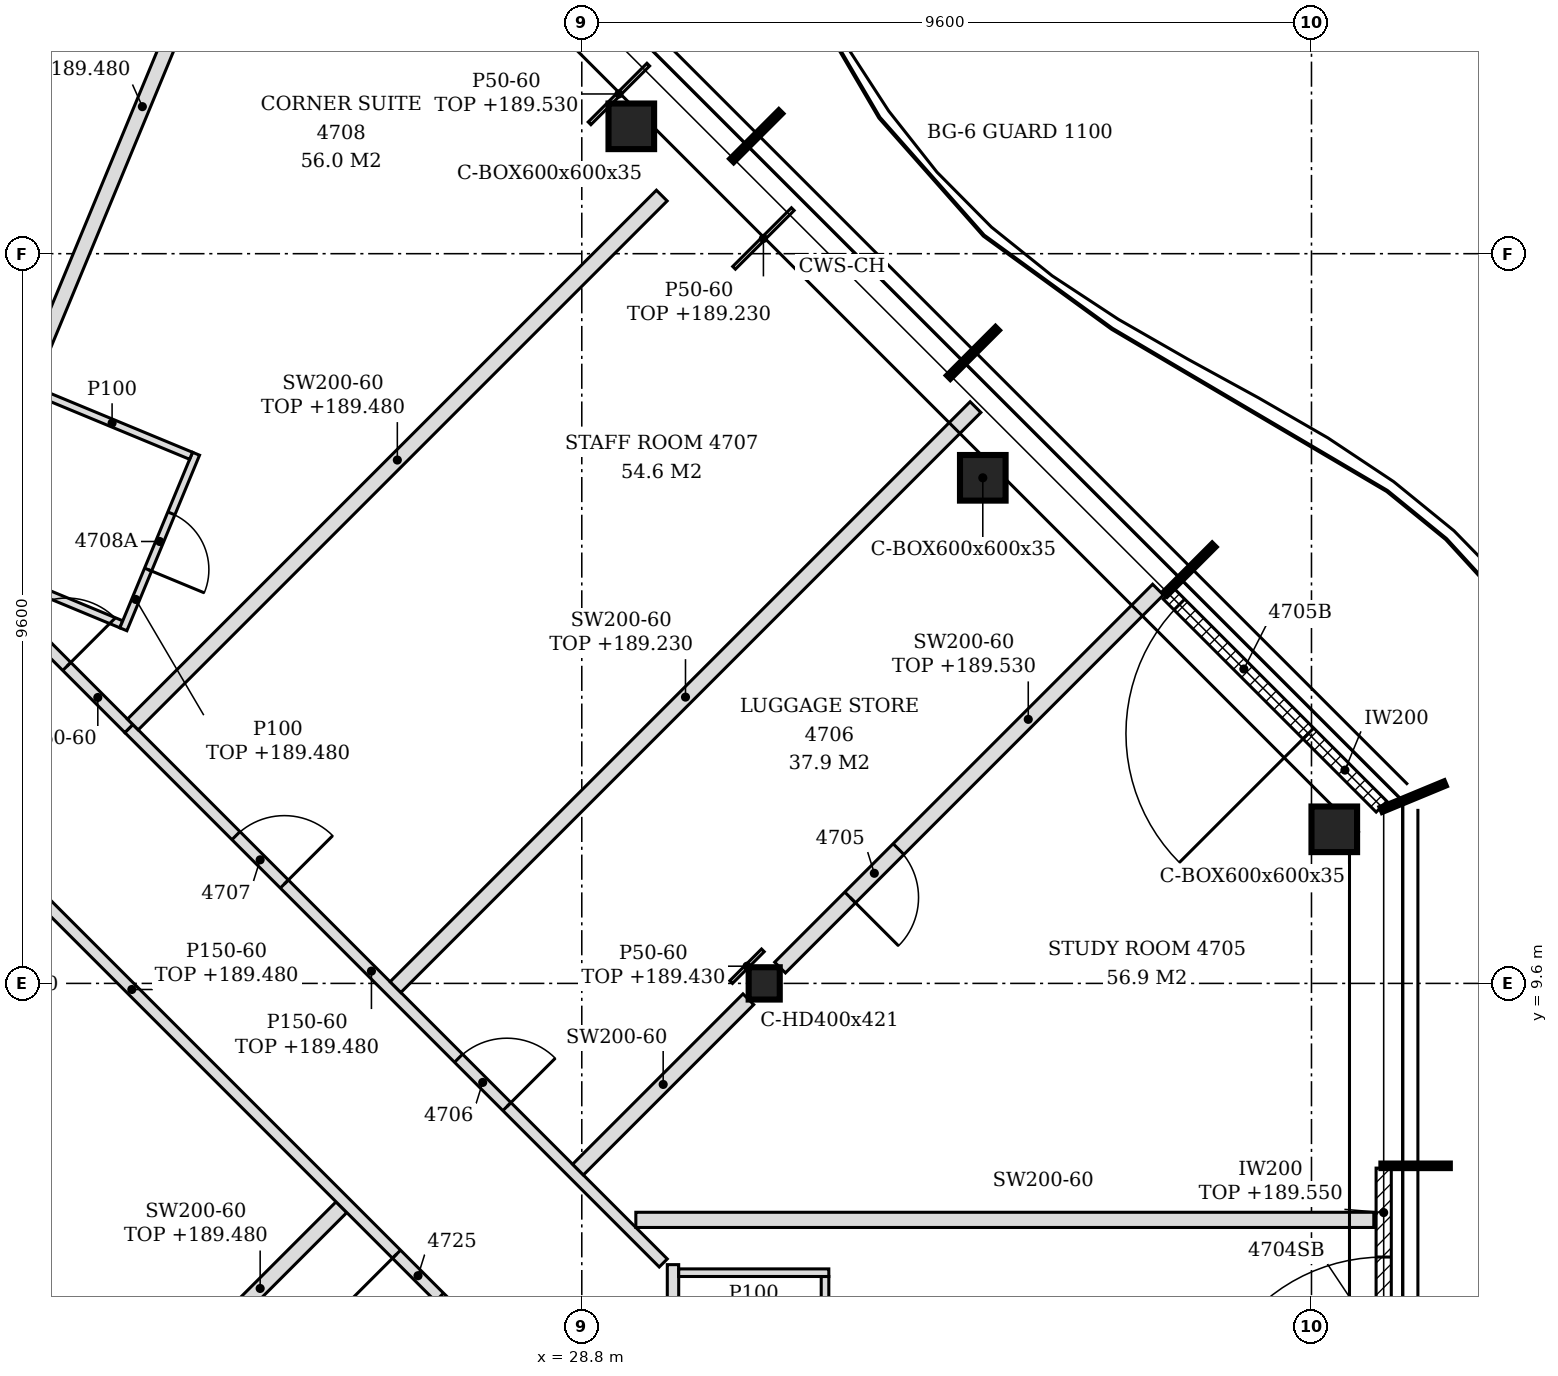
"""IFC4 building model, lengths in metres.
Left out: names, types, materials, properties, quantities, classifications, styles, units other than length and angle.
Written with IfcOpenShell. Run it as: python <this file> out.ifc"""

import sys

from ifc_helpers import new_model, si_unit, direction, frame, frame_2d, origin, origin_2d, place, context, subcontext, project, spatial, polyline, rectangle, hollow_rectangle, i_section, outline, extrude, clip, halfspace, element, fill, save


model = new_model("IFC4")
c1 = context("Model", 3, precision=1e-05, world=origin(), true_north=direction((0.0, 1.0)))
c2 = subcontext(c1, "Body", "Model", "MODEL_VIEW")
j1 = project(units=[si_unit("LENGTHUNIT", "METRE"), si_unit("PLANEANGLEUNIT", "RADIAN")], contexts=[c1])
p1 = place(None, origin())
s1 = spatial("IfcSite", under=j1, at=p1, CompositionType="ELEMENT")
p2 = place(p1, origin())
s2 = spatial("IfcBuilding", under=s1, at=p2, CompositionType="ELEMENT")
p3 = place(p2, frame((0.0, 0.0, 186.6)))
s3 = spatial("IfcBuildingStorey", under=s2, at=p3, CompositionType="ELEMENT", Elevation=186.6)
for number, where, z_axis, x_axis in (
    (1, (38.7, 11.627, -0.15), (0.387, -0.258, 0.885), (0.555, 0.832, 0.0)),
    (2, (34.076, 16.251, -0.15), (0.387, -0.258, 0.885), (0.555, 0.832, 0.0)),
):
    element("IfcColumn", number, at=place(p3, frame(where, z_axis=z_axis, x_axis=x_axis)), inside=s3, PredefinedType="COLUMN", context=c2, shape_type="Clipping", body=[
        clip(extrude(hollow_rectangle(XDim=0.6, YDim=0.6, WallThickness=0.035, at=origin_2d()), origin(), (0.0, 0.0, 1.0), 4.067), halfspace(frame((0.0, 0.0, 4.049), z_axis=(0.0, 0.0, 1.0), x_axis=(1.0, 0.0, 0.0)), False)),
    ])
p4 = place(p3, frame((29.451, 20.876, -0.15), z_axis=(0.38726387287, -0.258155907814, 0.885088820419), x_axis=(0.554670435147, 0.832070134288, 0.0)))
e3 = element("IfcColumn", 3, at=p4, inside=s3, PredefinedType="COLUMN", context=c2, shape_type="Clipping", body=[
    clip(extrude(hollow_rectangle(XDim=0.6, YDim=0.6, WallThickness=0.035, at=origin_2d()), origin(), (0.0, 0.0, 1.0), 4.067), halfspace(frame((0.0, 0.0, 4.049), z_axis=(0.0, 0.0, 1.0), x_axis=(1.0, 0.0, 0.0)), False)),
])
p5 = place(p3, frame((31.2, 9.6, -0.15), z_axis=(0.0, 0.0, 1.0), x_axis=(1.0, 0.0, 0.0)))
e4 = element("IfcColumn", 4, at=p5, inside=s3, PredefinedType="COLUMN", context=c2, shape_type="SweptSolid", body=[
    extrude(i_section(OverallWidth=0.409, OverallDepth=0.425, WebThickness=0.033, FlangeThickness=0.052, FilletRadius=0.015, at=origin_2d()), origin(), (0.0, 0.0, 1.0), 3.6),
])
p6 = place(p3, frame((39.35, 2.43, 0.0), z_axis=(0.0, 0.0, 1.0), x_axis=(0.0, 1.0, 0.0)))
e5 = element("IfcWall", 5, at=p6, inside=s3, PredefinedType="NOTDEFINED", context=c2, shape_type="SweptSolid", body=[
    extrude(rectangle(XDim=4.74, YDim=0.2, at=frame_2d((2.37, 0.0))), origin(), (0.0, 0.0, 1.0), 2.95),
])
p7 = place(p6, frame((1.17, 0.0, 0.0)))
e6 = element("IfcOpeningElement", 6, at=p7, cuts=e5, PredefinedType="OPENING", context=c2, shape_type="SweptSolid", body=[
    extrude(rectangle(XDim=2.4, YDim=2.4, at=frame_2d((1.2, 1.2))), frame((0.0, 0.11, 0.0), z_axis=(0.0, -1.0, 0.0), x_axis=(1.0, 0.0, 0.0)), (0.0, 0.0, 1.0), 0.22),
])
p8 = place(p3, frame((39.322, 11.925, 0.0), z_axis=(0.0, 0.0, 1.0), x_axis=(-0.707137595296, 0.707075965734, 0.0)))
e7 = element("IfcWall", 7, at=p8, inside=s3, PredefinedType="NOTDEFINED", context=c2, shape_type="SweptSolid", body=[
    extrude(rectangle(XDim=3.961, YDim=0.2, at=frame_2d((1.981, 0.0))), origin(), (0.0, 0.0, 1.0), 3.45),
])
p9 = place(p8, frame((1.362, 0.0, 0.0)))
e8 = element("IfcOpeningElement", 8, at=p9, cuts=e7, PredefinedType="OPENING", context=c2, shape_type="SweptSolid", body=[
    extrude(rectangle(XDim=2.4, YDim=2.4, at=frame_2d((1.2, 1.2))), frame((0.0, 0.11, 0.0), z_axis=(0.0, -1.0, 0.0), x_axis=(1.0, 0.0, 0.0)), (0.0, 0.0, 1.0), 0.22),
])
p10 = place(p3, frame((30.0, -0.813, 0.0), z_axis=(0.0, 0.0, 1.0), x_axis=(0.0, 1.0, 0.0)))
e9 = element("IfcWall", 9, at=p10, inside=s3, PredefinedType="PARTITIONING", context=c2, shape_type="SweptSolid", body=[
    extrude(outline(polyline([(0.0, 0.0), (6.713, 0.0), (6.713, 3.45), (2.268, 3.45), (2.266, 2.88), (2.058, 2.88), (2.056, 3.45), (0.0, 3.45), (0.0, 0.0)])), frame((0.0, 0.075, 0.0), z_axis=(0.0, -1.0, 0.0), x_axis=(1.0, 0.0, 0.0)), (0.0, 0.0, 1.0), 0.15),
])
p11 = place(p3, frame((32.0, 3.444, 0.0), z_axis=(0.0, 0.0, 1.0), x_axis=(0.0, 1.0, 0.0)))
e10 = element("IfcWall", 10, at=p11, inside=s3, PredefinedType="PARTITIONING", context=c2, shape_type="SweptSolid", body=[
    extrude(rectangle(XDim=2.3, YDim=0.1, at=frame_2d((1.15, 0.0))), origin(), (0.0, 0.0, 1.0), 3.45),
])
p12 = place(p11, frame((0.75, 0.0, 0.0)))
e11 = element("IfcOpeningElement", 11, at=p12, cuts=e10, PredefinedType="OPENING", context=c2, shape_type="SweptSolid", body=[
    extrude(rectangle(XDim=0.8, YDim=2.1, at=frame_2d((0.4, 1.05))), frame((0.0, 0.06, 0.0), z_axis=(0.0, -1.0, 0.0), x_axis=(1.0, 0.0, 0.0)), (0.0, 0.0, 1.0), 0.12),
])
p13 = place(p3, frame((23.499, 4.517, 0.0), z_axis=(0.0, 0.0, 1.0), x_axis=(0.707106781187, 0.707106781187, 0.0)))
e12 = element("IfcWall", 12, at=p13, inside=s3, PredefinedType="PARTITIONING", context=c2, shape_type="SweptSolid", body=[
    extrude(rectangle(XDim=3.025, YDim=0.2, at=frame_2d((1.512, 0.0))), origin(), (0.0, 0.0, 1.0), 2.88),
])
p14 = place(p3, frame((27.529, 4.871, 0.0), z_axis=(0.0, 0.0, 1.0), x_axis=(-0.707106781187, 0.707106781187, 0.0)))
e13 = element("IfcWall", 13, at=p14, inside=s3, PredefinedType="PARTITIONING", context=c2, shape_type="SweptSolid", body=[
    extrude(rectangle(XDim=11.5, YDim=0.15, at=frame_2d((5.75, 0.0))), origin(), (0.0, 0.0, 1.0), 2.88),
])
p15 = place(p14, frame((0.85, 0.0, 0.0)))
e14 = element("IfcOpeningElement", 14, at=p15, cuts=e13, PredefinedType="OPENING", context=c2, shape_type="SweptSolid", body=[
    extrude(rectangle(XDim=0.8, YDim=2.1, at=frame_2d((0.4, 1.05))), frame((0.0, 0.085, 0.0), z_axis=(0.0, -1.0, 0.0), x_axis=(1.0, 0.0, 0.0)), (0.0, 0.0, 1.0), 0.17),
])
p16 = place(p3, frame((30.075, 5.794, 0.0), z_axis=(0.0, 0.0, 1.0), x_axis=(1.0, 0.0, 0.0)))
e15 = element("IfcWall", 15, at=p16, inside=s3, PredefinedType="PARTITIONING", context=c2, shape_type="SweptSolid", body=[
    extrude(outline(polyline([(0.0, 0.0), (1.975, 0.0), (1.975, 3.45), (1.275, 3.45), (1.273, 2.93), (0.975, 2.93), (0.973, 3.45), (0.0, 3.45), (0.0, 0.0)])), frame((0.0, 0.05, 0.0), z_axis=(0.0, -1.0, 0.0), x_axis=(1.0, 0.0, 0.0)), (0.0, 0.0, 1.0), 0.1),
])
p17 = place(p3, frame((29.872, 5.922, 0.0), z_axis=(0.0, 0.0, 1.0), x_axis=(-0.707119057879, 0.707094504281, 0.0)))
e16 = element("IfcWall", 16, at=p17, inside=s3, PredefinedType="PARTITIONING", context=c2, shape_type="SweptSolid", body=[
    extrude(rectangle(XDim=9.943, YDim=0.15, at=frame_2d((4.972, 0.0))), origin(), (0.0, 0.0, 1.0), 2.88),
])
p18 = place(p17, frame((2.909, 0.0, 0.0)))
e17 = element("IfcOpeningElement", 17, at=p18, cuts=e16, PredefinedType="OPENING", context=c2, shape_type="SweptSolid", body=[
    extrude(rectangle(XDim=0.9, YDim=2.1, at=frame_2d((0.45, 1.05))), frame((0.0, 0.085, 0.0), z_axis=(0.0, -1.0, 0.0), x_axis=(1.0, 0.0, 0.0)), (0.0, 0.0, 1.0), 0.17),
])
p19 = place(p17, frame((7.05, 0.0, 0.0)))
e18 = element("IfcOpeningElement", 18, at=p19, cuts=e16, PredefinedType="OPENING", context=c2, shape_type="SweptSolid", body=[
    extrude(rectangle(XDim=0.9, YDim=2.1, at=frame_2d((0.45, 1.05))), frame((0.0, 0.085, 0.0), z_axis=(0.0, -1.0, 0.0), x_axis=(1.0, 0.0, 0.0)), (0.0, 0.0, 1.0), 0.17),
])
p20 = place(p3, frame((29.511, 6.489, 0.0), z_axis=(0.0, 0.0, 1.0), x_axis=(1.0, 0.0, 0.0)))
e19 = element("IfcWall", 19, at=p20, inside=s3, PredefinedType="PARTITIONING", context=c2, shape_type="SweptSolid", body=[
    extrude(outline(polyline([(0.0, 0.0), (9.709, 0.0), (9.709, 3.45), (1.839, 3.45), (1.837, 2.93), (1.539, 2.93), (1.537, 3.45), (0.0, 3.45), (0.0, 0.0)])), frame((0.0, 0.1, 0.0), z_axis=(0.0, -1.0, 0.0), x_axis=(1.0, 0.0, 0.0)), (0.0, 0.0, 1.0), 0.2),
])
p21 = place(p3, frame((28.75, 7.15, 0.0), z_axis=(0.0, 0.0, 1.0), x_axis=(0.707068272989, 0.707145287287, 0.0)))
e20 = element("IfcWall", 20, at=p21, inside=s3, PredefinedType="PARTITIONING", context=c2, shape_type="SweptSolid", body=[
    extrude(rectangle(XDim=3.17, YDim=0.2, at=frame_2d((1.585, 0.0))), origin(), (0.0, 0.0, 1.0), 3.45),
])
p22 = place(p3, frame((26.349, 9.551, 0.0), z_axis=(0.0, 0.0, 1.0), x_axis=(0.707095469378, 0.707118092814, 0.0)))
e21 = element("IfcWall", 21, at=p22, inside=s3, PredefinedType="PARTITIONING", context=c2, shape_type="SweptSolid", body=[
    extrude(rectangle(XDim=10.792, YDim=0.2, at=frame_2d((5.396, 0.0))), origin(), (0.0, 0.0, 1.0), 2.63),
])
p23 = place(p3, frame((31.408, 9.809, 0.0), z_axis=(0.0, 0.0, 1.0), x_axis=(0.707124140529, 0.707089421418, 0.0)))
e22 = element("IfcWall", 22, at=p23, inside=s3, PredefinedType="PARTITIONING", context=c2, shape_type="SweptSolid", body=[
    extrude(rectangle(XDim=7.032, YDim=0.2, at=frame_2d((3.516, 0.0))), origin(), (0.0, 0.0, 1.0), 2.93),
])
p24 = place(p23, frame((1.304, 0.0, 0.0)))
e23 = element("IfcOpeningElement", 23, at=p24, cuts=e22, PredefinedType="OPENING", context=c2, shape_type="SweptSolid", body=[
    extrude(rectangle(XDim=0.9, YDim=2.1, at=frame_2d((0.45, 1.05))), frame((0.0, 0.11, 0.0), z_axis=(0.0, -1.0, 0.0), x_axis=(1.0, 0.0, 0.0)), (0.0, 0.0, 1.0), 0.22),
])
p25 = place(p3, frame((22.841, 12.953, 0.0), z_axis=(0.0, 0.0, 1.0), x_axis=(-0.706947809344, 0.707265717297, 0.0)))
e24 = element("IfcWall", 24, at=p25, inside=s3, PredefinedType="PARTITIONING", context=c2, shape_type="SweptSolid", body=[
    extrude(rectangle(XDim=3.072, YDim=0.15, at=frame_2d((1.536, 0.0))), origin(), (0.0, 0.0, 1.0), 3.45),
])
p26 = place(p25, frame((1.155, 0.0, 0.0)))
e25 = element("IfcOpeningElement", 25, at=p26, cuts=e24, PredefinedType="OPENING", context=c2, shape_type="SweptSolid", body=[
    extrude(rectangle(XDim=0.9, YDim=2.1, at=frame_2d((0.45, 1.05))), frame((0.0, 0.085, 0.0), z_axis=(0.0, -1.0, 0.0), x_axis=(1.0, 0.0, 0.0)), (0.0, 0.0, 1.0), 0.17),
])
p27 = place(p3, frame((22.894, 13.006, 0.0), z_axis=(0.0, 0.0, 1.0), x_axis=(0.707106781187, 0.707106781187, 0.0)))
e26 = element("IfcWall", 26, at=p27, inside=s3, PredefinedType="PARTITIONING", context=c2, shape_type="SweptSolid", body=[
    extrude(rectangle(XDim=9.841, YDim=0.2, at=frame_2d((4.92, 0.0))), origin(), (0.0, 0.0, 1.0), 2.88),
])
p28 = place(p3, frame((22.742, 14.324, 0.0), z_axis=(0.0, 0.0, 1.0), x_axis=(-0.923772075785, 0.382942752901, 0.0)))
e27 = element("IfcWall", 27, at=p28, inside=s3, PredefinedType="PARTITIONING", context=c2, shape_type="SweptSolid", body=[
    extrude(rectangle(XDim=2.25, YDim=0.1, at=frame_2d((1.125, 0.0))), origin(), (0.0, 0.0, 1.0), 3.45),
])
p29 = place(p3, frame((22.769, 14.259, 0.0), z_axis=(0.0, 0.0, 1.0), x_axis=(0.382596216825, 0.923915653548, 0.0)))
e28 = element("IfcWall", 28, at=p29, inside=s3, PredefinedType="PARTITIONING", context=c2, shape_type="SweptSolid", body=[
    extrude(rectangle(XDim=2.5, YDim=0.1, at=frame_2d((1.25, 0.0))), origin(), (0.0, 0.0, 1.0), 2.88),
])
p30 = place(p29, frame((0.85, 0.0, 0.0)))
e29 = element("IfcOpeningElement", 29, at=p30, cuts=e28, PredefinedType="OPENING", context=c2, shape_type="SweptSolid", body=[
    extrude(rectangle(XDim=0.8, YDim=2.1, at=frame_2d((0.4, 1.05))), frame((0.0, 0.06, 0.0), z_axis=(0.0, -1.0, 0.0), x_axis=(1.0, 0.0, 0.0)), (0.0, 0.0, 1.0), 0.12),
])
p31 = place(p3, frame((23.66, 16.541, 0.0), z_axis=(0.0, 0.0, 1.0), x_axis=(-0.923826362943, 0.382811769845, 0.0)))
e30 = element("IfcWall", 30, at=p31, inside=s3, PredefinedType="PARTITIONING", context=c2, shape_type="SweptSolid", body=[
    extrude(rectangle(XDim=2.25, YDim=0.1, at=frame_2d((1.125, 0.0))), origin(), (0.0, 0.0, 1.0), 3.45),
])
p32 = place(p3, frame((21.489, 17.441, 0.0), z_axis=(0.0, 0.0, 1.0), x_axis=(0.382687087481, 0.923878018504, 0.0)))
e31 = element("IfcWall", 31, at=p32, inside=s3, PredefinedType="PARTITIONING", context=c2, shape_type="SweptSolid", body=[
    extrude(rectangle(XDim=7.996, YDim=0.2, at=frame_2d((3.998, 0.0))), origin(), (0.0, 0.0, 1.0), 2.88),
])
p33 = place(p3, frame((30.765, 9.618, 0.0), z_axis=(0.0, 0.0, 1.0), x_axis=(0.707106781187, 0.707106781187, 0.0)))
e32 = element("IfcWall", 32, at=p33, inside=s3, PredefinedType="PARTITIONING", context=c2, shape_type="SweptSolid", body=[
    extrude(rectangle(XDim=0.59, YDim=0.05, at=frame_2d((0.295, 0.0))), origin(), (0.0, 0.0, 1.0), 2.83),
])
p34 = place(p3, frame((28.902, 20.915, 0.0), z_axis=(0.0, 0.0, 1.0), x_axis=(0.707218497241, 0.706995047479, 0.0)))
e33 = element("IfcWall", 33, at=p34, inside=s3, PredefinedType="PARTITIONING", context=c2, shape_type="SweptSolid", body=[
    extrude(rectangle(XDim=1.093, YDim=0.05, at=frame_2d((0.546, 0.0))), origin(), (0.0, 0.0, 1.0), 2.93),
])
p35 = place(p3, frame((30.803, 19.014, 0.0), z_axis=(0.0, 0.0, 1.0), x_axis=(0.707106781187, 0.707106781187, 0.0)))
e34 = element("IfcWall", 34, at=p35, inside=s3, PredefinedType="PARTITIONING", context=c2, shape_type="SweptSolid", body=[
    extrude(rectangle(XDim=1.093, YDim=0.05, at=frame_2d((0.546, 0.0))), origin(), (0.0, 0.0, 1.0), 2.63),
])
p36 = place(p7, origin())
e35 = element("IfcDoor", 35, at=p36, inside=s3, OperationType="SINGLE_SWING_LEFT", PredefinedType="DOOR", context=c2, shape_type="SweptSolid", body=[
    extrude(rectangle(XDim=2.4, YDim=2.4, at=frame_2d((1.2, 1.2))), frame((0.0, 0.025, 0.0), z_axis=(0.0, -1.0, 0.0), x_axis=(1.0, 0.0, 0.0)), (0.0, 0.0, 1.0), 0.05),
])
fill(e6, e35)
p37 = place(p9, origin())
e36 = element("IfcDoor", 36, at=p37, inside=s3, OperationType="SINGLE_SWING_LEFT", PredefinedType="DOOR", context=c2, shape_type="SweptSolid", body=[
    extrude(rectangle(XDim=2.4, YDim=2.4, at=frame_2d((1.2, 1.2))), frame((0.0, 0.025, 0.0), z_axis=(0.0, -1.0, 0.0), x_axis=(1.0, 0.0, 0.0)), (0.0, 0.0, 1.0), 0.05),
])
fill(e8, e36)
p38 = place(p24, frame((0.9, 0.0, 0.0), z_axis=(0.0, 0.0, 1.0), x_axis=(-1.0, 0.0, 0.0)))
e37 = element("IfcDoor", 37, at=p38, inside=s3, OperationType="SINGLE_SWING_RIGHT", PredefinedType="DOOR", context=c2, shape_type="SweptSolid", body=[
    extrude(rectangle(XDim=0.9, YDim=2.1, at=frame_2d((0.45, 1.05))), frame((0.0, 0.025, 0.0), z_axis=(0.0, -1.0, 0.0), x_axis=(1.0, 0.0, 0.0)), (0.0, 0.0, 1.0), 0.05),
])
fill(e23, e37)
p39 = place(p18, frame((0.9, 0.0, 0.0), z_axis=(0.0, 0.0, 1.0), x_axis=(-1.0, 0.0, 0.0)))
e38 = element("IfcDoor", 38, at=p39, inside=s3, OperationType="SINGLE_SWING_RIGHT", PredefinedType="DOOR", context=c2, shape_type="SweptSolid", body=[
    extrude(rectangle(XDim=0.9, YDim=2.1, at=frame_2d((0.45, 1.05))), frame((0.0, 0.025, 0.0), z_axis=(0.0, -1.0, 0.0), x_axis=(1.0, 0.0, 0.0)), (0.0, 0.0, 1.0), 0.05),
])
fill(e17, e38)
p40 = place(p19, frame((0.9, 0.0, 0.0), z_axis=(0.0, 0.0, 1.0), x_axis=(-1.0, 0.0, 0.0)))
e39 = element("IfcDoor", 39, at=p40, inside=s3, OperationType="SINGLE_SWING_RIGHT", PredefinedType="DOOR", context=c2, shape_type="SweptSolid", body=[
    extrude(rectangle(XDim=0.9, YDim=2.1, at=frame_2d((0.45, 1.05))), frame((0.0, 0.025, 0.0), z_axis=(0.0, -1.0, 0.0), x_axis=(1.0, 0.0, 0.0)), (0.0, 0.0, 1.0), 0.05),
])
fill(e18, e39)
p41 = place(p26, frame((0.9, 0.0, 0.0), z_axis=(0.0, 0.0, 1.0), x_axis=(-1.0, 0.0, 0.0)))
e40 = element("IfcDoor", 40, at=p41, inside=s3, OperationType="SINGLE_SWING_RIGHT", PredefinedType="DOOR", context=c2, shape_type="SweptSolid", body=[
    extrude(rectangle(XDim=0.9, YDim=2.1, at=frame_2d((0.45, 1.05))), frame((0.0, 0.025, 0.0), z_axis=(0.0, -1.0, 0.0), x_axis=(1.0, 0.0, 0.0)), (0.0, 0.0, 1.0), 0.05),
])
fill(e25, e40)
p42 = place(p30, frame((0.8, 0.0, 0.0), z_axis=(0.0, 0.0, 1.0), x_axis=(-1.0, 0.0, 0.0)))
e41 = element("IfcDoor", 41, at=p42, inside=s3, OperationType="SINGLE_SWING_RIGHT", PredefinedType="DOOR", context=c2, shape_type="SweptSolid", body=[
    extrude(rectangle(XDim=0.8, YDim=2.1, at=frame_2d((0.4, 1.05))), frame((0.0, 0.025, 0.0), z_axis=(0.0, -1.0, 0.0), x_axis=(1.0, 0.0, 0.0)), (0.0, 0.0, 1.0), 0.05),
])
fill(e29, e41)
p43 = place(p15, origin())
e42 = element("IfcDoor", 42, at=p43, inside=s3, OperationType="SINGLE_SWING_RIGHT", PredefinedType="DOOR", context=c2, shape_type="SweptSolid", body=[
    extrude(rectangle(XDim=0.8, YDim=2.1, at=frame_2d((0.4, 1.05))), frame((0.0, 0.025, 0.0), z_axis=(0.0, -1.0, 0.0), x_axis=(1.0, 0.0, 0.0)), (0.0, 0.0, 1.0), 0.05),
])
fill(e14, e42)
save(model, sys.argv[1])
